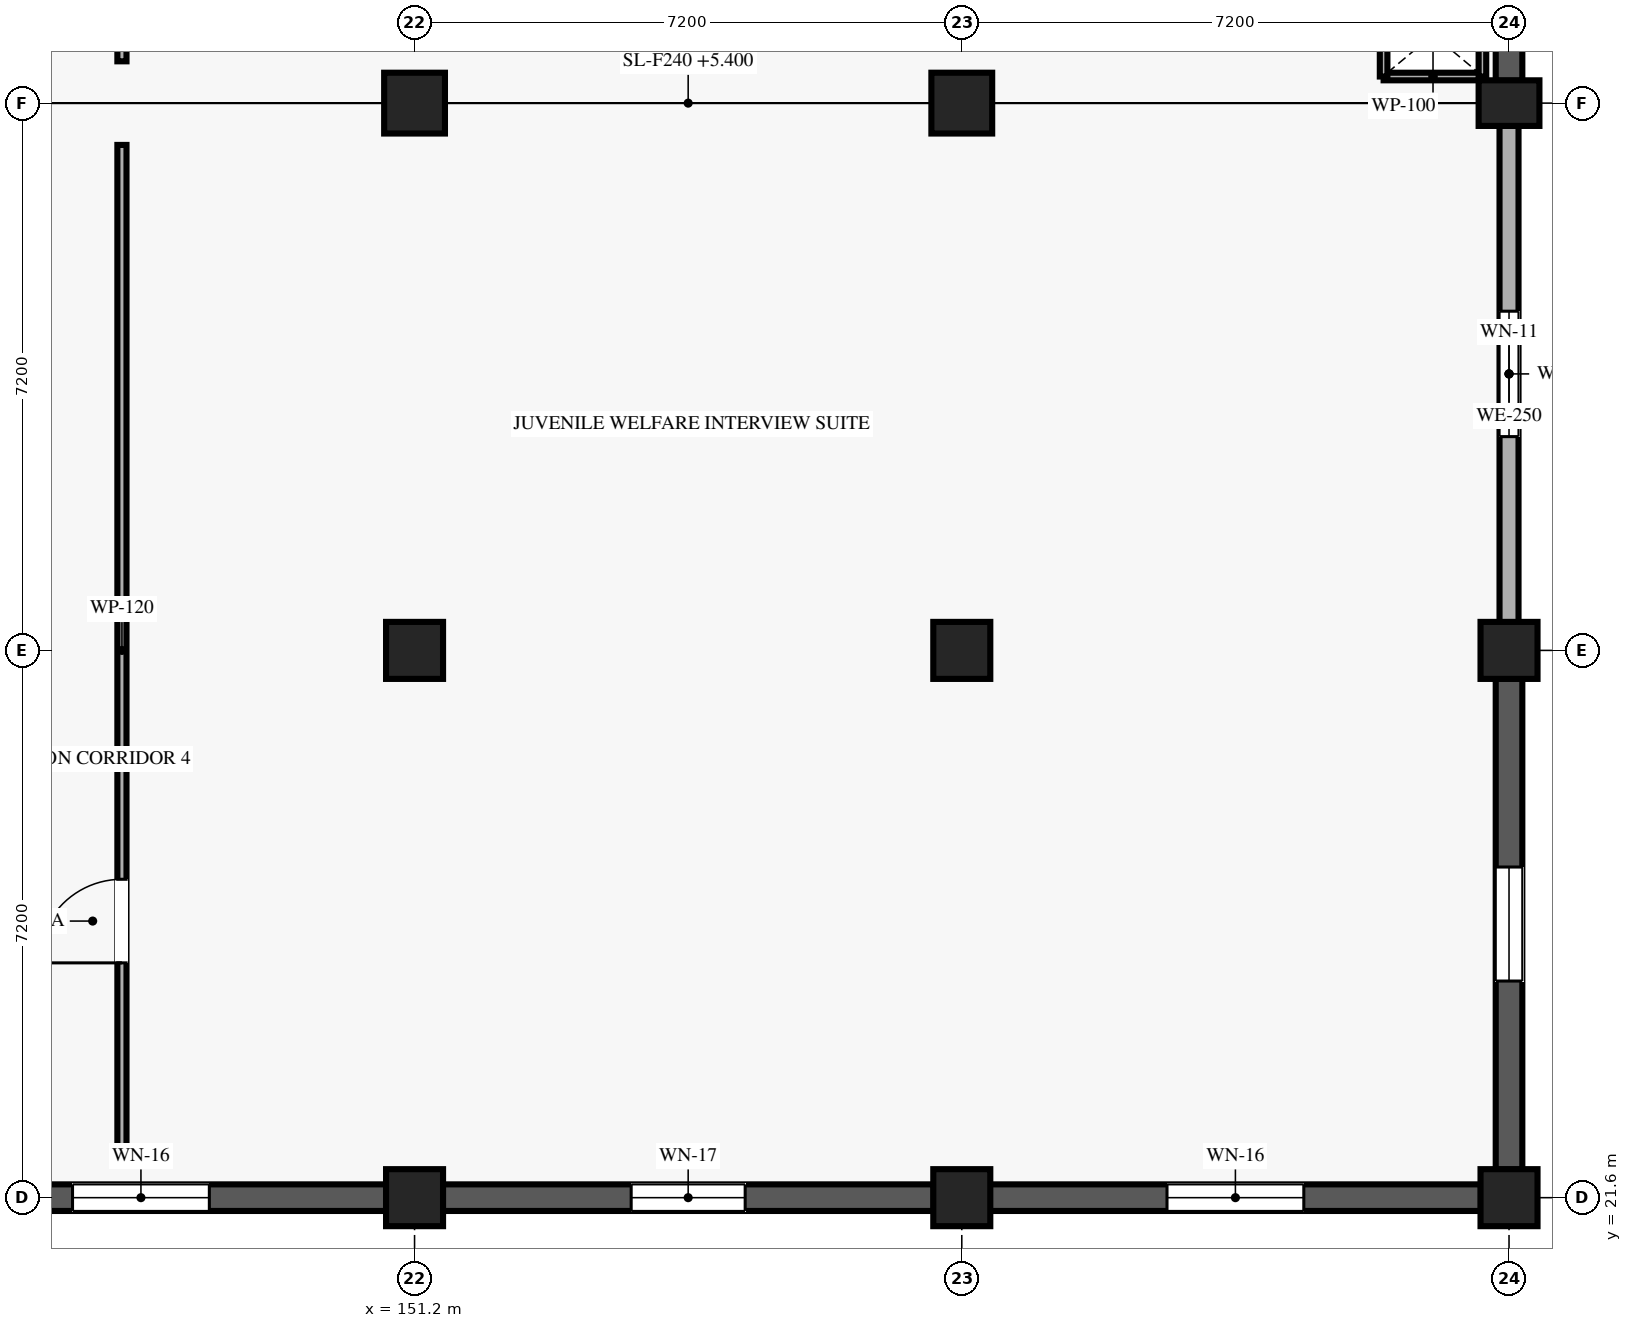
"""IFC4 building model, lengths in metres.
Left out: names, types, materials, properties, quantities, classifications, styles, units other than length and angle.
Written with IfcOpenShell. Run it as: python <this file> out.ifc"""

import sys

from ifc_helpers import new_model, si_unit, direction, frame, frame_2d, origin, origin_2d, place, context, subcontext, project, spatial, rectangle, extrude, element, fill, save


model = new_model("IFC4")
c1 = context("Model", 3, precision=1e-05, world=origin(), true_north=direction((0.0, 1.0)))
c2 = subcontext(c1, "Body", "Model", "MODEL_VIEW")
j1 = project(units=[si_unit("LENGTHUNIT", "METRE"), si_unit("PLANEANGLEUNIT", "RADIAN")], contexts=[c1])
p1 = place(None, origin())
s1 = spatial("IfcSite", under=j1, at=p1, CompositionType="ELEMENT")
p2 = place(p1, origin())
s2 = spatial("IfcBuilding", under=s1, at=p2, CompositionType="ELEMENT")
p3 = place(p2, frame((0.0, 0.0, 5.4)))
s3 = spatial("IfcBuildingStorey", under=s2, at=p3, CompositionType="ELEMENT", Elevation=5.4)
for number, where, z_axis, x_axis in (
    (1, (151.2, 21.6, 0.0), (0.0, 0.0, 1.0), (1.0, 0.0, 0.0)),
    (2, (151.2, 28.8, 0.0), (0.0, 0.0, 1.0), (1.0, 0.0, 0.0)),
):
    element("IfcColumn", number, at=place(p3, frame(where, z_axis=z_axis, x_axis=x_axis)), inside=s3, PredefinedType="COLUMN", context=c2, shape_type="SweptSolid", body=[
        extrude(rectangle(XDim=0.75, YDim=0.75, at=origin_2d()), origin(), (0.0, 0.0, 1.0), 4.05),
    ])
p4 = place(p3, frame((151.2, 36.0, 0.0), z_axis=(0.0, 0.0, 1.0), x_axis=(1.0, 0.0, 0.0)))
e3 = element("IfcColumn", 3, at=p4, inside=s3, PredefinedType="COLUMN", context=c2, shape_type="SweptSolid", body=[
    extrude(rectangle(XDim=0.8, YDim=0.8, at=origin_2d()), origin(), (0.0, 0.0, 1.0), 4.05),
])
for number, where, z_axis, x_axis in (
    (4, (158.4, 21.6, 0.0), (0.0, 0.0, 1.0), (1.0, 0.0, 0.0)),
    (5, (158.4, 28.8, 0.0), (0.0, 0.0, 1.0), (1.0, 0.0, 0.0)),
):
    element("IfcColumn", number, at=place(p3, frame(where, z_axis=z_axis, x_axis=x_axis)), inside=s3, PredefinedType="COLUMN", context=c2, shape_type="SweptSolid", body=[
        extrude(rectangle(XDim=0.75, YDim=0.75, at=origin_2d()), origin(), (0.0, 0.0, 1.0), 4.05),
    ])
p5 = place(p3, frame((158.4, 36.0, 0.0), z_axis=(0.0, 0.0, 1.0), x_axis=(1.0, 0.0, 0.0)))
e6 = element("IfcColumn", 6, at=p5, inside=s3, PredefinedType="COLUMN", context=c2, shape_type="SweptSolid", body=[
    extrude(rectangle(XDim=0.8, YDim=0.8, at=origin_2d()), origin(), (0.0, 0.0, 1.0), 4.05),
])
for number, where, z_axis, x_axis in (
    (7, (165.6, 21.6, 0.0), (0.0, 0.0, 1.0), (1.0, 0.0, 0.0)),
    (8, (165.6, 28.8, 0.0), (0.0, 0.0, 1.0), (1.0, 0.0, 0.0)),
):
    element("IfcColumn", number, at=place(p3, frame(where, z_axis=z_axis, x_axis=x_axis)), inside=s3, PredefinedType="COLUMN", context=c2, shape_type="SweptSolid", body=[
        extrude(rectangle(XDim=0.75, YDim=0.75, at=origin_2d()), origin(), (0.0, 0.0, 1.0), 4.05),
    ])
p6 = place(p3, frame((165.6, 36.0, 0.0), z_axis=(0.0, 0.0, 1.0), x_axis=(0.0, 1.0, 0.0)))
e9 = element("IfcColumn", 9, at=p6, inside=s3, PredefinedType="COLUMN", context=c2, shape_type="SweptSolid", body=[
    extrude(rectangle(XDim=0.6, YDim=0.8, at=origin_2d()), origin(), (0.0, 0.0, 1.0), 4.05),
])
p7 = place(p3, frame((144.37, 21.6, 0.0), z_axis=(0.0, 0.0, 1.0), x_axis=(1.0, 0.0, 0.0)))
e10 = element("IfcWall", 10, at=p7, inside=s3, PredefinedType="SOLIDWALL", context=c2, shape_type="SweptSolid", body=[
    extrude(rectangle(XDim=6.46, YDim=0.35, at=frame_2d((3.23, 0.0))), origin(), (0.0, 0.0, 1.0), 3.81),
])
p8 = place(p7, frame((2.33, 0.0, 1.85)))
e11 = element("IfcOpeningElement", 11, at=p8, cuts=e10, PredefinedType="OPENING", context=c2, shape_type="SweptSolid", body=[
    extrude(rectangle(XDim=1.8, YDim=0.75, at=frame_2d((0.9, 0.375))), frame((0.0, 0.185, 0.0), z_axis=(0.0, -1.0, 0.0), x_axis=(1.0, 0.0, 0.0)), (0.0, 0.0, 1.0), 0.37),
])
p9 = place(p3, frame((151.57, 21.6, 0.0), z_axis=(0.0, 0.0, 1.0), x_axis=(1.0, 0.0, 0.0)))
e12 = element("IfcWall", 12, at=p9, inside=s3, PredefinedType="SOLIDWALL", context=c2, shape_type="SweptSolid", body=[
    extrude(rectangle(XDim=6.46, YDim=0.35, at=frame_2d((3.23, 0.0))), origin(), (0.0, 0.0, 1.0), 3.81),
])
p10 = place(p9, frame((2.48, 0.0, 1.85)))
e13 = element("IfcOpeningElement", 13, at=p10, cuts=e12, PredefinedType="OPENING", context=c2, shape_type="SweptSolid", body=[
    extrude(rectangle(XDim=1.5, YDim=0.7, at=frame_2d((0.75, 0.35))), frame((0.0, 0.185, 0.0), z_axis=(0.0, -1.0, 0.0), x_axis=(1.0, 0.0, 0.0)), (0.0, 0.0, 1.0), 0.37),
])
p11 = place(p3, frame((158.77, 21.6, 0.0), z_axis=(0.0, 0.0, 1.0), x_axis=(1.0, 0.0, 0.0)))
e14 = element("IfcWall", 14, at=p11, inside=s3, PredefinedType="SOLIDWALL", context=c2, shape_type="SweptSolid", body=[
    extrude(rectangle(XDim=6.46, YDim=0.35, at=frame_2d((3.23, 0.0))), origin(), (0.0, 0.0, 1.0), 3.81),
])
p12 = place(p11, frame((2.33, 0.0, 1.85)))
e15 = element("IfcOpeningElement", 15, at=p12, cuts=e14, PredefinedType="OPENING", context=c2, shape_type="SweptSolid", body=[
    extrude(rectangle(XDim=1.8, YDim=0.75, at=frame_2d((0.9, 0.375))), frame((0.0, 0.185, 0.0), z_axis=(0.0, -1.0, 0.0), x_axis=(1.0, 0.0, 0.0)), (0.0, 0.0, 1.0), 0.37),
])
p13 = place(p3, frame((165.6, 21.97, 0.0), z_axis=(0.0, 0.0, 1.0), x_axis=(0.0, 1.0, 0.0)))
e16 = element("IfcWall", 16, at=p13, inside=s3, PredefinedType="SOLIDWALL", context=c2, shape_type="SweptSolid", body=[
    extrude(rectangle(XDim=6.46, YDim=0.35, at=frame_2d((3.23, 0.0))), origin(), (0.0, 0.0, 1.0), 3.81),
])
p14 = place(p13, frame((2.48, 0.0, 1.85)))
e17 = element("IfcOpeningElement", 17, at=p14, cuts=e16, PredefinedType="OPENING", context=c2, shape_type="SweptSolid", body=[
    extrude(rectangle(XDim=1.5, YDim=0.7, at=frame_2d((0.75, 0.35))), frame((0.0, 0.185, 0.0), z_axis=(0.0, -1.0, 0.0), x_axis=(1.0, 0.0, 0.0)), (0.0, 0.0, 1.0), 0.37),
])
p15 = place(p3, frame((165.6, 29.17, 0.0), z_axis=(0.0, 0.0, 1.0), x_axis=(0.0, 1.0, 0.0)))
e18 = element("IfcWall", 18, at=p15, inside=s3, PredefinedType="SOLIDWALL", context=c2, shape_type="SweptSolid", body=[
    extrude(rectangle(XDim=6.535, YDim=0.25, at=frame_2d((3.268, 0.0))), origin(), (0.0, 0.0, 1.0), 3.195),
])
p16 = place(p15, frame((2.442, 0.0, 0.85)))
e19 = element("IfcOpeningElement", 19, at=p16, cuts=e18, PredefinedType="OPENING", context=c2, shape_type="SweptSolid", body=[
    extrude(rectangle(XDim=1.65, YDim=1.55, at=frame_2d((0.825, 0.775))), frame((0.0, 0.135, 0.0), z_axis=(0.0, -1.0, 0.0), x_axis=(1.0, 0.0, 0.0)), (0.0, 0.0, 1.0), 0.27),
])
p17 = place(p3, frame((165.6, 36.295, 0.0), z_axis=(0.0, 0.0, 1.0), x_axis=(0.0, 1.0, 0.0)))
e20 = element("IfcWall", 20, at=p17, inside=s3, PredefinedType="SOLIDWALL", context=c2, shape_type="SweptSolid", body=[
    extrude(rectangle(XDim=3.085, YDim=0.35, at=frame_2d((1.542, 0.0))), origin(), (0.0, 0.0, 1.0), 3.81),
])
p18 = place(p17, frame((0.792, 0.0, 1.85)))
e21 = element("IfcOpeningElement", 21, at=p18, cuts=e20, PredefinedType="OPENING", context=c2, shape_type="SweptSolid", body=[
    extrude(rectangle(XDim=1.5, YDim=0.7, at=frame_2d((0.75, 0.35))), frame((0.0, 0.185, 0.0), z_axis=(0.0, -1.0, 0.0), x_axis=(1.0, 0.0, 0.0)), (0.0, 0.0, 1.0), 0.37),
])
p19 = place(p3, frame((163.95, 36.35, 0.0), z_axis=(0.0, 0.0, 1.0), x_axis=(1.0, 0.0, 0.0)))
e22 = element("IfcWall", 22, at=p19, inside=s3, PredefinedType="PARTITIONING", context=c2, shape_type="SweptSolid", body=[
    extrude(rectangle(XDim=1.3, YDim=0.1, at=frame_2d((0.65, 0.0))), origin(), (0.0, 0.0, 1.0), 3.2),
])
p20 = place(p3, frame((163.95, 36.35, 0.0), z_axis=(0.0, 0.0, 1.0), x_axis=(0.0, 1.0, 0.0)))
e23 = element("IfcWall", 23, at=p20, inside=s3, PredefinedType="PARTITIONING", context=c2, shape_type="SweptSolid", body=[
    extrude(rectangle(XDim=1.1, YDim=0.1, at=frame_2d((0.55, 0.0))), origin(), (0.0, 0.0, 1.0), 3.81),
])
p21 = place(p3, frame((165.25, 36.35, 0.0), z_axis=(0.0, 0.0, 1.0), x_axis=(0.0, 1.0, 0.0)))
e24 = element("IfcWall", 24, at=p21, inside=s3, PredefinedType="PARTITIONING", context=c2, shape_type="SweptSolid", body=[
    extrude(rectangle(XDim=1.1, YDim=0.1, at=frame_2d((0.55, 0.0))), origin(), (0.0, 0.0, 1.0), 3.2),
])
p22 = place(p3, frame((147.35, 36.55, 0.0), z_axis=(0.0, 0.0, 1.0), x_axis=(0.0, 1.0, 0.0)))
e25 = element("IfcWall", 25, at=p22, inside=s3, PredefinedType="PARTITIONING", context=c2, shape_type="SweptSolid", body=[
    extrude(rectangle(XDim=15.95, YDim=0.12, at=frame_2d((7.975, 0.0))), origin(), (0.0, 0.0, 1.0), 3.81),
])
p23 = place(p22, frame((2.25, 0.0, 0.0)))
e26 = element("IfcOpeningElement", 26, at=p23, cuts=e25, PredefinedType="OPENING", context=c2, shape_type="SweptSolid", body=[
    extrude(rectangle(XDim=1.7, YDim=2.2, at=frame_2d((0.85, 1.1))), frame((0.0, 0.07, 0.0), z_axis=(0.0, -1.0, 0.0), x_axis=(1.0, 0.0, 0.0)), (0.0, 0.0, 1.0), 0.14),
])
p24 = place(p3, frame((147.35, 22.15, 0.0), z_axis=(0.0, 0.0, 1.0), x_axis=(0.0, 1.0, 0.0)))
e27 = element("IfcWall", 27, at=p24, inside=s3, PredefinedType="PARTITIONING", context=c2, shape_type="SweptSolid", body=[
    extrude(rectangle(XDim=13.3, YDim=0.12, at=frame_2d((6.65, 0.0))), origin(), (0.0, 0.0, 1.0), 3.81),
])
p25 = place(p24, frame((2.539, 0.0, 0.0)))
e28 = element("IfcOpeningElement", 28, at=p25, cuts=e27, PredefinedType="OPENING", context=c2, shape_type="SweptSolid", body=[
    extrude(rectangle(XDim=1.1, YDim=2.2, at=frame_2d((0.55, 1.1))), frame((0.0, 0.07, 0.0), z_axis=(0.0, -1.0, 0.0), x_axis=(1.0, 0.0, 0.0)), (0.0, 0.0, 1.0), 0.14),
])
p26 = place(p8, origin())
e29 = element("IfcWindow", 29, at=p26, inside=s3, PartitioningType="SINGLE_PANEL", PredefinedType="WINDOW", context=c2, shape_type="SweptSolid", body=[
    extrude(rectangle(XDim=1.8, YDim=0.75, at=frame_2d((0.9, 0.375))), frame((0.0, 0.03, 0.0), z_axis=(0.0, -1.0, 0.0), x_axis=(1.0, 0.0, 0.0)), (0.0, 0.0, 1.0), 0.06),
])
fill(e11, e29)
p27 = place(p10, origin())
e30 = element("IfcWindow", 30, at=p27, inside=s3, PartitioningType="SINGLE_PANEL", PredefinedType="WINDOW", context=c2, shape_type="SweptSolid", body=[
    extrude(rectangle(XDim=1.5, YDim=0.7, at=frame_2d((0.75, 0.35))), frame((0.0, 0.03, 0.0), z_axis=(0.0, -1.0, 0.0), x_axis=(1.0, 0.0, 0.0)), (0.0, 0.0, 1.0), 0.06),
])
fill(e13, e30)
p28 = place(p12, origin())
e31 = element("IfcWindow", 31, at=p28, inside=s3, PartitioningType="SINGLE_PANEL", PredefinedType="WINDOW", context=c2, shape_type="SweptSolid", body=[
    extrude(rectangle(XDim=1.8, YDim=0.75, at=frame_2d((0.9, 0.375))), frame((0.0, 0.03, 0.0), z_axis=(0.0, -1.0, 0.0), x_axis=(1.0, 0.0, 0.0)), (0.0, 0.0, 1.0), 0.06),
])
fill(e15, e31)
p29 = place(p14, origin())
e32 = element("IfcWindow", 32, at=p29, inside=s3, PartitioningType="SINGLE_PANEL", PredefinedType="WINDOW", context=c2, shape_type="SweptSolid", body=[
    extrude(rectangle(XDim=1.5, YDim=0.7, at=frame_2d((0.75, 0.35))), frame((0.0, 0.03, 0.0), z_axis=(0.0, -1.0, 0.0), x_axis=(1.0, 0.0, 0.0)), (0.0, 0.0, 1.0), 0.06),
])
fill(e17, e32)
p30 = place(p16, origin())
e33 = element("IfcWindow", 33, at=p30, inside=s3, PartitioningType="SINGLE_PANEL", PredefinedType="WINDOW", context=c2, shape_type="SweptSolid", body=[
    extrude(rectangle(XDim=1.65, YDim=1.55, at=frame_2d((0.825, 0.775))), frame((0.0, 0.03, 0.0), z_axis=(0.0, -1.0, 0.0), x_axis=(1.0, 0.0, 0.0)), (0.0, 0.0, 1.0), 0.06),
])
fill(e19, e33)
p31 = place(p25, origin())
e34 = element("IfcDoor", 34, at=p31, inside=s3, OperationType="SINGLE_SWING_LEFT", PredefinedType="DOOR", context=c2, shape_type="SweptSolid", body=[
    extrude(rectangle(XDim=1.1, YDim=2.2, at=frame_2d((0.55, 1.1))), frame((0.0, 0.025, 0.0), z_axis=(0.0, -1.0, 0.0), x_axis=(1.0, 0.0, 0.0)), (0.0, 0.0, 1.0), 0.05),
])
fill(e28, e34)
save(model, sys.argv[1])
